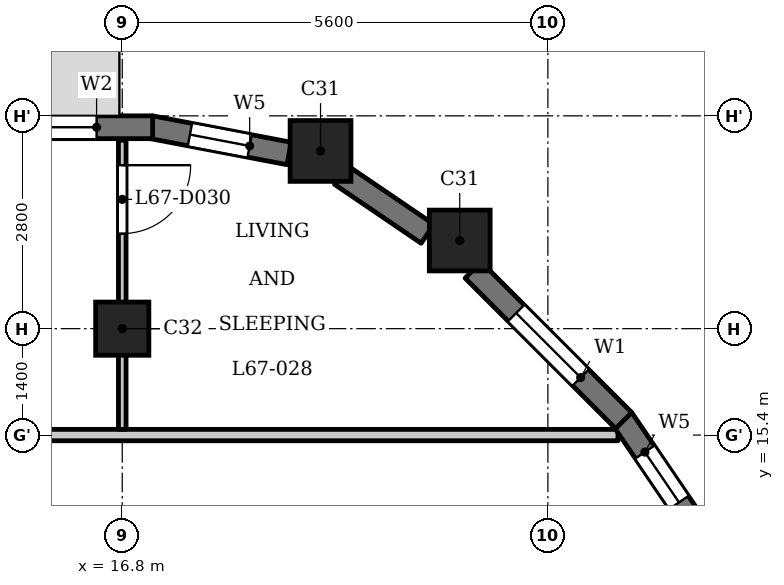
"""IFC4 building model, lengths in metres.
Left out: names, types, materials, properties, quantities, classifications, styles, units other than length and angle.
Written with IfcOpenShell. Run it as: python <this file> out.ifc"""

import sys

from ifc_helpers import new_model, si_unit, direction, frame, frame_2d, origin, origin_2d, place, context, subcontext, project, spatial, rectangle, extrude, element, fill, save


model = new_model("IFC4")
c1 = context("Model", 3, precision=1e-05, world=origin(), true_north=direction((0.0, 1.0)))
c2 = subcontext(c1, "Body", "Model", "MODEL_VIEW")
j1 = project(units=[si_unit("LENGTHUNIT", "METRE"), si_unit("PLANEANGLEUNIT", "RADIAN")], contexts=[c1])
p1 = place(None, origin())
s1 = spatial("IfcSite", under=j1, at=p1, CompositionType="ELEMENT")
p2 = place(p1, origin())
s2 = spatial("IfcBuilding", under=s1, at=p2, CompositionType="ELEMENT")
p3 = place(p2, frame((0.0, 0.0, 259.2)))
s3 = spatial("IfcBuildingStorey", under=s2, at=p3, CompositionType="ELEMENT", Elevation=259.2)
for number, where, z_axis, x_axis in (
    (1, (21.24, 17.96, 0.0), (0.0, 0.0, 1.0), (1.0, 0.0, 0.0)),
    (2, (19.409, 19.138, 0.0), (0.0, 0.0, 1.0), (1.0, 0.0, 0.0)),
):
    element("IfcColumn", number, at=place(p3, frame(where, z_axis=z_axis, x_axis=x_axis)), inside=s3, PredefinedType="COLUMN", context=c2, shape_type="SweptSolid", body=[
        extrude(rectangle(XDim=0.8, YDim=0.8, at=origin_2d()), origin(), (0.0, 0.0, 1.0), 3.5),
    ])
p4 = place(p3, frame((16.8, 16.8, 0.0), z_axis=(0.0, 0.0, 1.0), x_axis=(1.0, 0.0, 0.0)))
e3 = element("IfcColumn", 3, at=p4, inside=s3, PredefinedType="COLUMN", context=c2, shape_type="SweptSolid", body=[
    extrude(rectangle(XDim=0.7, YDim=0.7, at=origin_2d()), origin(), (0.0, 0.0, 1.0), 3.5),
])
p5 = place(p3, frame((24.422, 14.078, 0.0), z_axis=(0.0, 0.0, 1.0), x_axis=(-0.562054549384, 0.827100165347, 0.0)))
e4 = element("IfcWall", 4, at=p5, inside=s3, PredefinedType="SOLIDWALL", context=c2, shape_type="SweptSolid", body=[
    extrude(rectangle(XDim=1.856, YDim=0.3, at=frame_2d((0.928, 0.0))), origin(), (0.0, 0.0, 1.0), 2.55),
])
p6 = place(p5, frame((0.528, 0.0, 0.6)))
e5 = element("IfcOpeningElement", 5, at=p6, cuts=e4, PredefinedType="OPENING", context=c2, shape_type="SweptSolid", body=[
    extrude(rectangle(XDim=0.8, YDim=1.55, at=frame_2d((0.4, 0.775))), frame((0.0, 0.16, 0.0), z_axis=(0.0, -1.0, 0.0), x_axis=(1.0, 0.0, 0.0)), (0.0, 0.0, 1.0), 0.32),
])
p7 = place(p3, frame((23.397, 15.591, 0.0), z_axis=(0.0, 0.0, 1.0), x_axis=(-0.707150377276, 0.707063182409, 0.0)))
e6 = element("IfcWall", 6, at=p7, inside=s3, PredefinedType="SOLIDWALL", context=c2, shape_type="SweptSolid", body=[
    extrude(rectangle(XDim=2.8, YDim=0.3, at=frame_2d((1.4, 0.0))), origin(), (0.0, 0.0, 1.0), 2.55),
])
p8 = place(p7, frame((0.8, 0.0, 0.6)))
e7 = element("IfcOpeningElement", 7, at=p8, cuts=e6, PredefinedType="OPENING", context=c2, shape_type="SweptSolid", body=[
    extrude(rectangle(XDim=1.2, YDim=1.55, at=frame_2d((0.6, 0.775))), frame((0.0, 0.16, 0.0), z_axis=(0.0, -1.0, 0.0), x_axis=(1.0, 0.0, 0.0)), (0.0, 0.0, 1.0), 0.32),
])
p9 = place(p3, frame((20.817, 18.048, 0.0), z_axis=(0.0, 0.0, 1.0), x_axis=(-0.827025410886, 0.562164539747, 0.0)))
e8 = element("IfcWall", 8, at=p9, inside=s3, PredefinedType="SOLIDWALL", context=c2, shape_type="SweptSolid", body=[
    extrude(rectangle(XDim=1.377, YDim=0.3, at=frame_2d((0.688, 0.0))), origin(), (0.0, 0.0, 1.0), 2.55),
])
p10 = place(p3, frame((18.995, 19.105, 0.0), z_axis=(0.0, 0.0, 1.0), x_axis=(-0.982301706131, 0.187305520826, 0.0)))
e9 = element("IfcWall", 9, at=p10, inside=s3, PredefinedType="SOLIDWALL", context=c2, shape_type="SweptSolid", body=[
    extrude(rectangle(XDim=1.856, YDim=0.3, at=frame_2d((0.928, 0.0))), origin(), (0.0, 0.0, 1.0), 2.55),
])
p11 = place(p10, frame((0.528, 0.0, 0.6)))
e10 = element("IfcOpeningElement", 10, at=p11, cuts=e9, PredefinedType="OPENING", context=c2, shape_type="SweptSolid", body=[
    extrude(rectangle(XDim=0.8, YDim=1.55, at=frame_2d((0.4, 0.775))), frame((0.0, 0.16, 0.0), z_axis=(0.0, -1.0, 0.0), x_axis=(1.0, 0.0, 0.0)), (0.0, 0.0, 1.0), 0.32),
])
p12 = place(p3, frame((17.2, 19.45, 0.0), z_axis=(0.0, 0.0, 1.0), x_axis=(-1.0, 0.0, 0.0)))
e11 = element("IfcWall", 11, at=p12, inside=s3, PredefinedType="SOLIDWALL", context=c2, shape_type="SweptSolid", body=[
    extrude(rectangle(XDim=2.8, YDim=0.3, at=frame_2d((1.4, 0.0))), origin(), (0.0, 0.0, 1.0), 2.55),
])
p13 = place(p12, frame((0.738, 0.0, 0.9)))
e12 = element("IfcOpeningElement", 12, at=p13, cuts=e11, PredefinedType="OPENING", context=c2, shape_type="SweptSolid", body=[
    extrude(rectangle(XDim=1.8, YDim=1.25, at=frame_2d((0.9, 0.625))), frame((0.0, 0.16, 0.0), z_axis=(0.0, -1.0, 0.0), x_axis=(1.0, 0.0, 0.0)), (0.0, 0.0, 1.0), 0.32),
])
p14 = place(p3, frame((-23.55, 15.4, 0.0), z_axis=(0.0, 0.0, 1.0), x_axis=(1.0, 0.0, 0.0)))
e13 = element("IfcWall", 13, at=p14, inside=s3, PredefinedType="PARTITIONING", context=c2, shape_type="SweptSolid", body=[
    extrude(rectangle(XDim=46.872, YDim=0.15, at=frame_2d((23.436, 0.0))), origin(), (0.0, 0.0, 1.0), 3.2),
])
p15 = place(p14, frame((8.05, 0.0, 0.0)))
e14 = element("IfcOpeningElement", 14, at=p15, cuts=e13, PredefinedType="OPENING", context=c2, shape_type="SweptSolid", body=[
    extrude(rectangle(XDim=1.0, YDim=2.1, at=frame_2d((0.5, 1.05))), frame((0.0, 0.085, 0.0), z_axis=(0.0, -1.0, 0.0), x_axis=(1.0, 0.0, 0.0)), (0.0, 0.0, 1.0), 0.17),
])
p16 = place(p14, frame((18.5, 0.0, 0.0)))
e15 = element("IfcOpeningElement", 15, at=p16, cuts=e13, PredefinedType="OPENING", context=c2, shape_type="SweptSolid", body=[
    extrude(rectangle(XDim=1.0, YDim=2.1, at=frame_2d((0.5, 1.05))), frame((0.0, 0.085, 0.0), z_axis=(0.0, -1.0, 0.0), x_axis=(1.0, 0.0, 0.0)), (0.0, 0.0, 1.0), 0.17),
])
p17 = place(p14, frame((30.7, 0.0, 0.0)))
e16 = element("IfcOpeningElement", 16, at=p17, cuts=e13, PredefinedType="OPENING", context=c2, shape_type="SweptSolid", body=[
    extrude(rectangle(XDim=1.0, YDim=2.1, at=frame_2d((0.5, 1.05))), frame((0.0, 0.085, 0.0), z_axis=(0.0, -1.0, 0.0), x_axis=(1.0, 0.0, 0.0)), (0.0, 0.0, 1.0), 0.17),
])
p18 = place(p14, frame((37.7, 0.0, 0.0)))
e17 = element("IfcOpeningElement", 17, at=p18, cuts=e13, PredefinedType="OPENING", context=c2, shape_type="SweptSolid", body=[
    extrude(rectangle(XDim=1.0, YDim=2.1, at=frame_2d((0.5, 1.05))), frame((0.0, 0.085, 0.0), z_axis=(0.0, -1.0, 0.0), x_axis=(1.0, 0.0, 0.0)), (0.0, 0.0, 1.0), 0.17),
])
p19 = place(p3, frame((16.8, 15.475, 0.0), z_axis=(0.0, 0.0, 1.0), x_axis=(0.0, 1.0, 0.0)))
e18 = element("IfcWall", 18, at=p19, inside=s3, PredefinedType="PARTITIONING", context=c2, shape_type="SweptSolid", body=[
    extrude(rectangle(XDim=3.805, YDim=0.1, at=frame_2d((1.902, 0.0))), origin(), (0.0, 0.0, 1.0), 3.2),
])
p20 = place(p19, frame((2.576, 0.0, 0.0)))
e19 = element("IfcOpeningElement", 19, at=p20, cuts=e18, PredefinedType="OPENING", context=c2, shape_type="SweptSolid", body=[
    extrude(rectangle(XDim=0.9, YDim=2.1, at=frame_2d((0.45, 1.05))), frame((0.0, 0.06, 0.0), z_axis=(0.0, -1.0, 0.0), x_axis=(1.0, 0.0, 0.0)), (0.0, 0.0, 1.0), 0.12),
])
p21 = place(p20, origin())
e20 = element("IfcDoor", 20, at=p21, inside=s3, OperationType="SINGLE_SWING_RIGHT", PredefinedType="DOOR", context=c2, shape_type="SweptSolid", body=[
    extrude(rectangle(XDim=0.9, YDim=2.1, at=frame_2d((0.45, 1.05))), frame((0.0, 0.025, 0.0), z_axis=(0.0, -1.0, 0.0), x_axis=(1.0, 0.0, 0.0)), (0.0, 0.0, 1.0), 0.05),
])
fill(e19, e20)
p22 = place(p6, origin())
e21 = element("IfcWindow", 21, at=p22, inside=s3, PartitioningType="SINGLE_PANEL", PredefinedType="WINDOW", context=c2, shape_type="SweptSolid", body=[
    extrude(rectangle(XDim=0.8, YDim=1.55, at=frame_2d((0.4, 0.775))), frame((0.0, 0.03, 0.0), z_axis=(0.0, -1.0, 0.0), x_axis=(1.0, 0.0, 0.0)), (0.0, 0.0, 1.0), 0.06),
])
fill(e5, e21)
p23 = place(p8, origin())
e22 = element("IfcWindow", 22, at=p23, inside=s3, PartitioningType="SINGLE_PANEL", PredefinedType="WINDOW", context=c2, shape_type="SweptSolid", body=[
    extrude(rectangle(XDim=1.2, YDim=1.55, at=frame_2d((0.6, 0.775))), frame((0.0, 0.03, 0.0), z_axis=(0.0, -1.0, 0.0), x_axis=(1.0, 0.0, 0.0)), (0.0, 0.0, 1.0), 0.06),
])
fill(e7, e22)
p24 = place(p11, origin())
e23 = element("IfcWindow", 23, at=p24, inside=s3, PartitioningType="SINGLE_PANEL", PredefinedType="WINDOW", context=c2, shape_type="SweptSolid", body=[
    extrude(rectangle(XDim=0.8, YDim=1.55, at=frame_2d((0.4, 0.775))), frame((0.0, 0.03, 0.0), z_axis=(0.0, -1.0, 0.0), x_axis=(1.0, 0.0, 0.0)), (0.0, 0.0, 1.0), 0.06),
])
fill(e10, e23)
p25 = place(p13, origin())
e24 = element("IfcWindow", 24, at=p25, inside=s3, PartitioningType="SINGLE_PANEL", PredefinedType="WINDOW", context=c2, shape_type="SweptSolid", body=[
    extrude(rectangle(XDim=1.8, YDim=1.25, at=frame_2d((0.9, 0.625))), frame((0.0, 0.03, 0.0), z_axis=(0.0, -1.0, 0.0), x_axis=(1.0, 0.0, 0.0)), (0.0, 0.0, 1.0), 0.06),
])
fill(e12, e24)
save(model, sys.argv[1])
